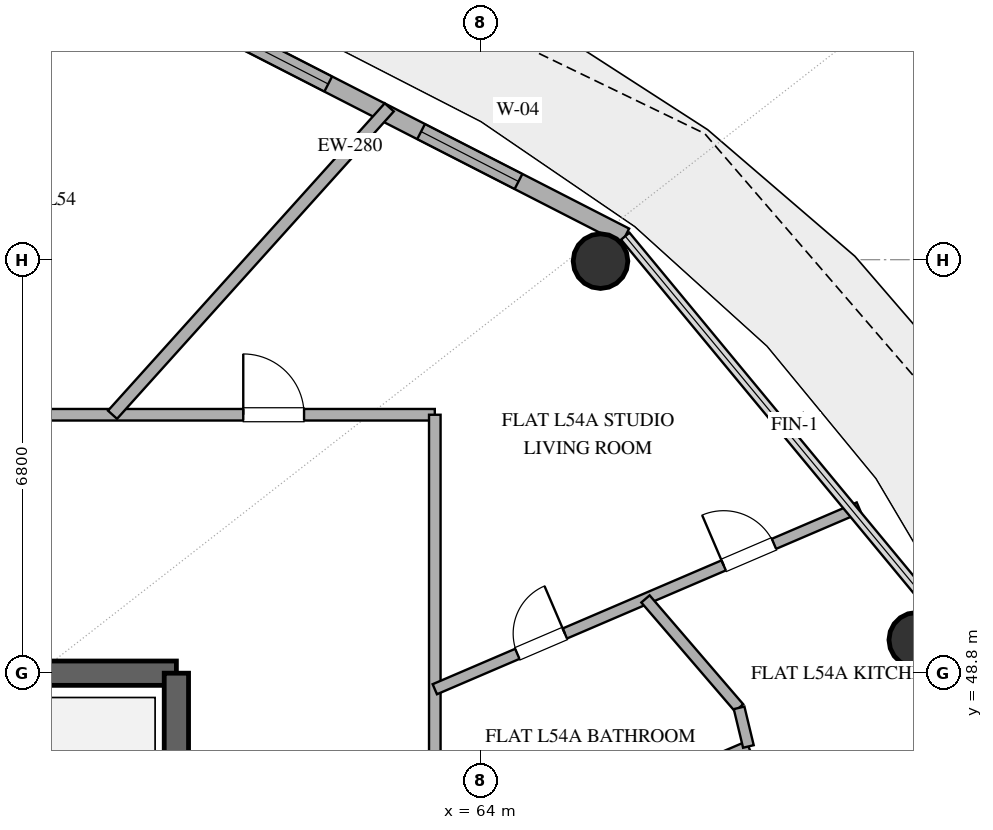
"""IFC4 building model, lengths in metres.
Left out: names, types, materials, properties, quantities, classifications, styles, units other than length and angle.
Written with IfcOpenShell. Run it as: python <this file> out.ifc"""

import sys

from ifc_helpers import new_model, si_unit, direction, frame, frame_2d, origin, origin_2d, place, context, subcontext, project, spatial, rectangle, hollow_circle, extrude, element, fill, save


model = new_model("IFC4")
c1 = context("Model", 3, precision=1e-05, world=origin(), true_north=direction((0.0, 1.0)))
c2 = subcontext(c1, "Body", "Model", "MODEL_VIEW")
j1 = project(units=[si_unit("LENGTHUNIT", "METRE"), si_unit("PLANEANGLEUNIT", "RADIAN")], contexts=[c1])
p1 = place(None, origin())
s1 = spatial("IfcSite", under=j1, at=p1, CompositionType="ELEMENT")
p2 = place(p1, origin())
s2 = spatial("IfcBuilding", under=s1, at=p2, CompositionType="ELEMENT")
p3 = place(p2, frame((0.0, 0.0, 213.6)))
s3 = spatial("IfcBuildingStorey", under=s2, at=p3, CompositionType="ELEMENT", Elevation=213.6)
p4 = place(p3, frame((55.0, 48.8, 0.0), z_axis=(0.0, 0.0, 1.0), x_axis=(1.0, 0.0, 0.0)))
e1 = element("IfcWall", 1, at=p4, inside=s3, PredefinedType="SHEAR", context=c2, shape_type="SweptSolid", body=[
    extrude(rectangle(XDim=4.0, YDim=0.4, at=frame_2d((2.0, 0.0))), origin(), (0.0, 0.0, 1.0), 3.36),
])
p5 = place(p3, frame((59.0, 35.2, 0.0), z_axis=(0.0, 0.0, 1.0), x_axis=(0.0, 1.0, 0.0)))
e2 = element("IfcWall", 2, at=p5, inside=s3, PredefinedType="SHEAR", context=c2, shape_type="SweptSolid", body=[
    extrude(rectangle(XDim=13.6, YDim=0.4, at=frame_2d((6.8, 0.0))), origin(), (0.0, 0.0, 1.0), 3.36),
])
for number, where, z_axis, x_axis in (
    (3, (71.169, 49.347, 0.0), (0.0, 0.0, 1.0), (1.0, 0.0, 0.0)),
    (4, (65.975, 55.576, 0.0), (0.0, 0.0, 1.0), (1.0, 0.0, 0.0)),
):
    element("IfcColumn", number, at=place(p3, frame(where, z_axis=z_axis, x_axis=x_axis)), inside=s3, PredefinedType="COLUMN", context=c2, shape_type="SweptSolid", body=[
        extrude(hollow_circle(Radius=0.45, WallThickness=0.025, at=origin_2d()), origin(), (0.0, 0.0, 1.0), 3.36),
    ])
p6 = place(p3, frame((66.383, 55.987, 0.0), z_axis=(0.0, 0.0, 1.0), x_axis=(-0.890007394051, 0.455946091699, 0.0)))
e5 = element("IfcWall", 5, at=p6, inside=s3, PredefinedType="SOLIDWALL", context=c2, shape_type="SweptSolid", body=[
    extrude(rectangle(XDim=9.404, YDim=0.28, at=frame_2d((4.702, 0.0))), origin(), (0.0, 0.0, 1.0), 3.36),
])
p7 = place(p6, frame((1.973, 0.0, 0.85)))
e6 = element("IfcOpeningElement", 6, at=p7, cuts=e5, PredefinedType="OPENING", context=c2, shape_type="SweptSolid", body=[
    extrude(rectangle(XDim=1.8, YDim=2.2, at=frame_2d((0.9, 1.1))), frame((0.0, 0.15, 0.0), z_axis=(0.0, -1.0, 0.0), x_axis=(1.0, 0.0, 0.0)), (0.0, 0.0, 1.0), 0.3),
])
p8 = place(p6, frame((5.489, 0.0, 0.85)))
e7 = element("IfcOpeningElement", 7, at=p8, cuts=e5, PredefinedType="OPENING", context=c2, shape_type="SweptSolid", body=[
    extrude(rectangle(XDim=1.65, YDim=2.0, at=frame_2d((0.825, 1.0))), frame((0.0, 0.15, 0.0), z_axis=(0.0, -1.0, 0.0), x_axis=(1.0, 0.0, 0.0)), (0.0, 0.0, 1.0), 0.3),
])
p9 = place(p3, frame((45.931, 53.05, 0.0), z_axis=(0.0, 0.0, 1.0), x_axis=(1.0, 0.0, 0.0)))
e8 = element("IfcWall", 8, at=p9, inside=s3, PredefinedType="PARTITIONING", context=c2, shape_type="SweptSolid", body=[
    extrude(rectangle(XDim=17.319, YDim=0.19, at=frame_2d((8.659, 0.0))), origin(), (0.0, 0.0, 1.0), 2.72),
])
p10 = place(p9, frame((6.935, 0.0, 0.0)))
e9 = element("IfcOpeningElement", 9, at=p10, cuts=e8, PredefinedType="OPENING", context=c2, shape_type="SweptSolid", body=[
    extrude(rectangle(XDim=1.0, YDim=2.2, at=frame_2d((0.5, 1.1))), frame((0.0, 0.105, 0.0), z_axis=(0.0, -1.0, 0.0), x_axis=(1.0, 0.0, 0.0)), (0.0, 0.0, 1.0), 0.21),
])
p11 = place(p9, frame((14.168, 0.0, 0.0)))
e10 = element("IfcOpeningElement", 10, at=p11, cuts=e8, PredefinedType="OPENING", context=c2, shape_type="SweptSolid", body=[
    extrude(rectangle(XDim=1.0, YDim=2.2, at=frame_2d((0.5, 1.1))), frame((0.0, 0.105, 0.0), z_axis=(0.0, -1.0, 0.0), x_axis=(1.0, 0.0, 0.0)), (0.0, 0.0, 1.0), 0.21),
])
p12 = place(p3, frame((57.949, 53.05, 0.0), z_axis=(0.0, 0.0, 1.0), x_axis=(0.66913524162, 0.743140651844, 0.0)))
e11 = element("IfcWall", 11, at=p12, inside=s3, PredefinedType="PARTITIONING", context=c2, shape_type="SweptSolid", body=[
    extrude(rectangle(XDim=6.802, YDim=0.2, at=frame_2d((3.401, 0.0))), origin(), (0.0, 0.0, 1.0), 2.72),
])
p13 = place(p3, frame((68.407, 47.595, 0.0), z_axis=(0.0, 0.0, 1.0), x_axis=(-0.919138278408, -0.393935051963, 0.0)))
e12 = element("IfcWall", 12, at=p13, inside=s3, PredefinedType="PLUMBINGWALL", context=c2, shape_type="SweptSolid", body=[
    extrude(rectangle(XDim=5.611, YDim=0.18, at=frame_2d((2.806, 0.0))), origin(), (0.0, 0.0, 1.0), 2.72),
])
p14 = place(p3, frame((63.25, 45.35, 0.0), z_axis=(0.0, 0.0, 1.0), x_axis=(0.0, 1.0, 0.0)))
e13 = element("IfcWall", 13, at=p14, inside=s3, PredefinedType="PARTITIONING", context=c2, shape_type="SweptSolid", body=[
    extrude(rectangle(XDim=7.7, YDim=0.19, at=frame_2d((3.85, 0.0))), origin(), (0.0, 0.0, 1.0), 2.72),
])
p15 = place(p3, frame((63.25, 48.536, 0.0), z_axis=(0.0, 0.0, 1.0), x_axis=(0.919133380172, 0.393946480443, 0.0)))
e14 = element("IfcWall", 14, at=p15, inside=s3, PredefinedType="PLUMBINGWALL", context=c2, shape_type="SweptSolid", body=[
    extrude(rectangle(XDim=7.588, YDim=0.18, at=frame_2d((3.794, 0.0))), origin(), (0.0, 0.0, 1.0), 2.72),
])
p16 = place(p15, frame((5.169, 0.0, 0.0)))
e15 = element("IfcOpeningElement", 15, at=p16, cuts=e14, PredefinedType="OPENING", context=c2, shape_type="SweptSolid", body=[
    extrude(rectangle(XDim=0.9, YDim=2.1, at=frame_2d((0.45, 1.05))), frame((0.0, 0.1, 0.0), z_axis=(0.0, -1.0, 0.0), x_axis=(1.0, 0.0, 0.0)), (0.0, 0.0, 1.0), 0.2),
])
p17 = place(p15, frame((1.477, 0.0, 0.0)))
e16 = element("IfcOpeningElement", 16, at=p17, cuts=e14, PredefinedType="OPENING", context=c2, shape_type="SweptSolid", body=[
    extrude(rectangle(XDim=0.85, YDim=2.1, at=frame_2d((0.425, 1.05))), frame((0.0, 0.1, 0.0), z_axis=(0.0, -1.0, 0.0), x_axis=(1.0, 0.0, 0.0)), (0.0, 0.0, 1.0), 0.2),
])
p18 = place(p3, frame((66.715, 50.021, 0.0), z_axis=(0.0, 0.0, 1.0), x_axis=(0.651871704999, -0.758329268999, 0.0)))
e17 = element("IfcWall", 17, at=p18, inside=s3, PredefinedType="PLUMBINGWALL", context=c2, shape_type="SweptSolid", body=[
    extrude(rectangle(XDim=2.362, YDim=0.18, at=frame_2d((1.181, 0.0))), origin(), (0.0, 0.0, 1.0), 2.72),
])
p19 = place(p3, frame((68.255, 48.23, 0.0), z_axis=(0.0, 0.0, 1.0), x_axis=(0.233909944351, -0.972258267095, 0.0)))
e18 = element("IfcWall", 18, at=p19, inside=s3, PredefinedType="PLUMBINGWALL", context=c2, shape_type="SweptSolid", body=[
    extrude(rectangle(XDim=0.653, YDim=0.18, at=frame_2d((0.327, 0.0))), origin(), (0.0, 0.0, 1.0), 2.72),
])
p20 = place(p7, origin())
e19 = element("IfcWindow", 19, at=p20, inside=s3, PartitioningType="SINGLE_PANEL", PredefinedType="WINDOW", context=c2, shape_type="SweptSolid", body=[
    extrude(rectangle(XDim=1.8, YDim=2.2, at=frame_2d((0.9, 1.1))), frame((0.0, 0.03, 0.0), z_axis=(0.0, -1.0, 0.0), x_axis=(1.0, 0.0, 0.0)), (0.0, 0.0, 1.0), 0.06),
])
fill(e6, e19)
p21 = place(p8, origin())
e20 = element("IfcWindow", 20, at=p21, inside=s3, PartitioningType="SINGLE_PANEL", PredefinedType="WINDOW", context=c2, shape_type="SweptSolid", body=[
    extrude(rectangle(XDim=1.65, YDim=2.0, at=frame_2d((0.825, 1.0))), frame((0.0, 0.03, 0.0), z_axis=(0.0, -1.0, 0.0), x_axis=(1.0, 0.0, 0.0)), (0.0, 0.0, 1.0), 0.06),
])
fill(e7, e20)
p22 = place(p11, origin())
e21 = element("IfcDoor", 21, at=p22, inside=s3, OperationType="SINGLE_SWING_LEFT", PredefinedType="DOOR", context=c2, shape_type="SweptSolid", body=[
    extrude(rectangle(XDim=1.0, YDim=2.2, at=frame_2d((0.5, 1.1))), frame((0.0, 0.025, 0.0), z_axis=(0.0, -1.0, 0.0), x_axis=(1.0, 0.0, 0.0)), (0.0, 0.0, 1.0), 0.05),
])
fill(e10, e21)
p23 = place(p16, origin())
e22 = element("IfcDoor", 22, at=p23, inside=s3, OperationType="SINGLE_SWING_LEFT", PredefinedType="DOOR", context=c2, shape_type="SweptSolid", body=[
    extrude(rectangle(XDim=0.9, YDim=2.1, at=frame_2d((0.45, 1.05))), frame((0.0, 0.025, 0.0), z_axis=(0.0, -1.0, 0.0), x_axis=(1.0, 0.0, 0.0)), (0.0, 0.0, 1.0), 0.05),
])
fill(e15, e22)
p24 = place(p17, origin())
e23 = element("IfcDoor", 23, at=p24, inside=s3, OperationType="SINGLE_SWING_RIGHT", PredefinedType="DOOR", context=c2, shape_type="SweptSolid", body=[
    extrude(rectangle(XDim=0.85, YDim=2.1, at=frame_2d((0.425, 1.05))), frame((0.0, 0.025, 0.0), z_axis=(0.0, -1.0, 0.0), x_axis=(1.0, 0.0, 0.0)), (0.0, 0.0, 1.0), 0.05),
])
fill(e16, e23)
save(model, sys.argv[1])
